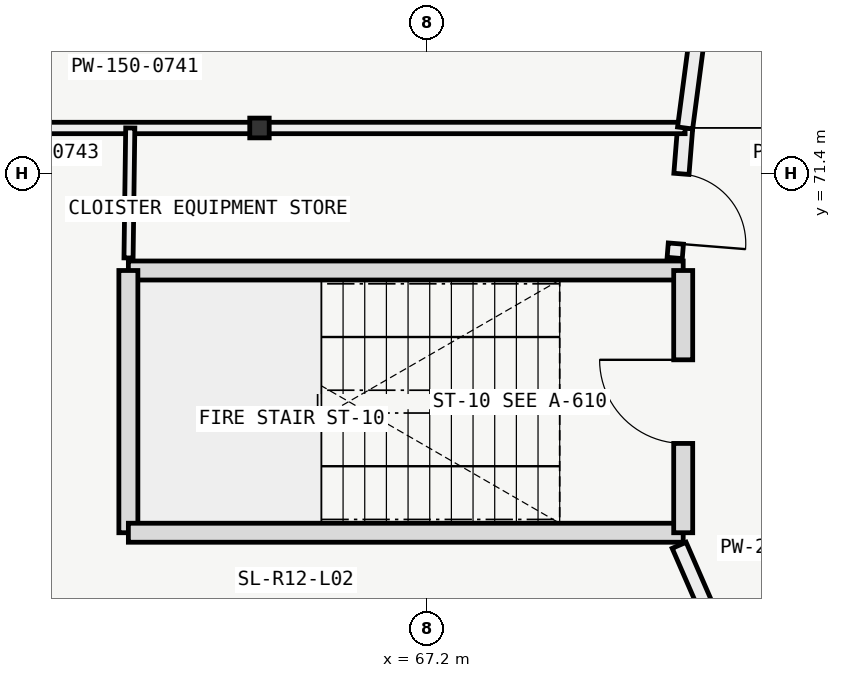
"""IFC4 building model, lengths in metres.
Left out: names, types, materials, properties, quantities, classifications, styles, units other than length and angle.
Written with IfcOpenShell. Run it as: python <this file> out.ifc"""

import sys

from ifc_helpers import new_model, si_unit, direction, frame, frame_2d, origin, origin_2d, place, context, subcontext, project, spatial, rectangle, i_section, extrude, element, fill, save


model = new_model("IFC4")
c1 = context("Model", 3, precision=1e-05, world=origin(), true_north=direction((0.0, 1.0)))
c2 = subcontext(c1, "Body", "Model", "MODEL_VIEW")
j1 = project(units=[si_unit("LENGTHUNIT", "METRE"), si_unit("PLANEANGLEUNIT", "RADIAN")], contexts=[c1])
p1 = place(None, origin())
s1 = spatial("IfcSite", under=j1, at=p1, CompositionType="ELEMENT")
p2 = place(p1, origin())
s2 = spatial("IfcBuilding", under=s1, at=p2, CompositionType="ELEMENT")
p3 = place(p2, frame((0.0, 0.0, 9.6)))
s3 = spatial("IfcBuildingStorey", under=s2, at=p3, CompositionType="ELEMENT", Elevation=9.6)
p4 = place(p3, frame((65.0, 72.0, 0.0), z_axis=(0.0, 0.0, 1.0), x_axis=(1.0, 0.0, 0.0)))
e1 = element("IfcColumn", 1, at=p4, inside=s3, PredefinedType="COLUMN", context=c2, shape_type="SweptSolid", body=[
    extrude(i_section(OverallWidth=0.256, OverallDepth=0.26, WebThickness=0.01, FlangeThickness=0.017, FilletRadius=0.014, at=origin_2d()), origin(), (0.0, 0.0, 1.0), 4.2),
])
p5 = place(p3, frame((70.575, 70.125, 0.0), z_axis=(0.0, 0.0, 1.0), x_axis=(-1.0, 0.0, 0.0)))
e2 = element("IfcWall", 2, at=p5, inside=s3, PredefinedType="SOLIDWALL", context=c2, shape_type="SweptSolid", body=[
    extrude(rectangle(XDim=7.3, YDim=0.25, at=frame_2d((3.65, 0.0))), origin(), (0.0, 0.0, 1.0), 3.95),
])
p6 = place(p3, frame((63.275, 70.125, 0.0), z_axis=(0.0, 0.0, 1.0), x_axis=(0.0, -1.0, 0.0)))
e3 = element("IfcWall", 3, at=p6, inside=s3, PredefinedType="SOLIDWALL", context=c2, shape_type="SweptSolid", body=[
    extrude(rectangle(XDim=3.45, YDim=0.25, at=frame_2d((1.725, 0.0))), origin(), (0.0, 0.0, 1.0), 3.95),
])
p7 = place(p3, frame((63.275, 66.675, 0.0), z_axis=(0.0, 0.0, 1.0), x_axis=(1.0, 0.0, 0.0)))
e4 = element("IfcWall", 4, at=p7, inside=s3, PredefinedType="SOLIDWALL", context=c2, shape_type="SweptSolid", body=[
    extrude(rectangle(XDim=7.3, YDim=0.25, at=frame_2d((3.65, 0.0))), origin(), (0.0, 0.0, 1.0), 3.95),
])
p8 = place(p3, frame((70.575, 66.675, 0.0), z_axis=(0.0, 0.0, 1.0), x_axis=(0.0, 1.0, 0.0)))
e5 = element("IfcWall", 5, at=p8, inside=s3, PredefinedType="SOLIDWALL", context=c2, shape_type="SweptSolid", body=[
    extrude(rectangle(XDim=3.45, YDim=0.25, at=frame_2d((1.725, 0.0))), origin(), (0.0, 0.0, 1.0), 3.95),
])
p9 = place(p8, frame((1.175, 0.0, 0.0)))
e6 = element("IfcOpeningElement", 6, at=p9, cuts=e5, PredefinedType="OPENING", context=c2, shape_type="SweptSolid", body=[
    extrude(rectangle(XDim=1.1, YDim=2.2, at=frame_2d((0.55, 1.1))), frame((0.0, 0.135, 0.0), z_axis=(0.0, -1.0, 0.0), x_axis=(1.0, 0.0, 0.0)), (0.0, 0.0, 1.0), 0.27),
])
p10 = place(p3, frame((70.6, 72.0, 0.0), z_axis=(0.0, 0.0, 1.0), x_axis=(-0.07984138391, -0.996807580938, 0.0)))
e7 = element("IfcWall", 7, at=p10, inside=s3, PredefinedType="PARTITIONING", context=c2, shape_type="SweptSolid", body=[
    extrude(rectangle(XDim=1.715, YDim=0.2, at=frame_2d((0.858, 0.0))), origin(), (0.0, 0.0, 1.0), 3.402),
])
p11 = place(p10, frame((0.605, 0.0, 0.0)))
e8 = element("IfcOpeningElement", 8, at=p11, cuts=e7, PredefinedType="OPENING", context=c2, shape_type="SweptSolid", body=[
    extrude(rectangle(XDim=0.92, YDim=2.1, at=frame_2d((0.46, 1.05))), frame((0.0, 0.11, 0.0), z_axis=(0.0, -1.0, 0.0), x_axis=(1.0, 0.0, 0.0)), (0.0, 0.0, 1.0), 0.22),
])
p12 = place(p3, frame((70.522, 66.51, 0.0), z_axis=(0.0, 0.0, 1.0), x_axis=(0.399219580964, -0.916855346374, 0.0)))
e9 = element("IfcWall", 9, at=p12, inside=s3, PredefinedType="PARTITIONING", context=c2, shape_type="SweptSolid", body=[
    extrude(rectangle(XDim=2.876, YDim=0.2, at=frame_2d((1.438, 0.0))), origin(), (0.0, 0.0, 1.0), 3.402),
])
p13 = place(p12, frame((1.17, 0.0, 0.0)))
e10 = element("IfcOpeningElement", 10, at=p13, cuts=e9, PredefinedType="OPENING", context=c2, shape_type="SweptSolid", body=[
    extrude(rectangle(XDim=1.5, YDim=2.2, at=frame_2d((0.75, 1.1))), frame((0.0, 0.11, 0.0), z_axis=(0.0, -1.0, 0.0), x_axis=(1.0, 0.0, 0.0)), (0.0, 0.0, 1.0), 0.22),
])
p14 = place(p3, frame((70.6, 72.0, 0.0), z_axis=(0.0, 0.0, 1.0), x_axis=(-1.0, 0.0, 0.0)))
e11 = element("IfcWall", 11, at=p14, inside=s3, PredefinedType="PARTITIONING", context=c2, shape_type="SweptSolid", body=[
    extrude(rectangle(XDim=14.48, YDim=0.15, at=frame_2d((7.24, 0.0))), origin(), (0.0, 0.0, 1.0), 3.397),
])
p15 = place(p3, frame((63.277, 70.29, 0.0), z_axis=(0.0, 0.0, 1.0), x_axis=(0.013419693814, 0.999909951855, 0.0)))
e12 = element("IfcWall", 12, at=p15, inside=s3, PredefinedType="PARTITIONING", context=c2, shape_type="SweptSolid", body=[
    extrude(rectangle(XDim=1.71, YDim=0.12, at=frame_2d((0.855, 0.0))), origin(), (0.0, 0.0, 1.0), 3.397),
])
p16 = place(p3, frame((71.67, 80.127, 0.0), z_axis=(0.0, 0.0, 1.0), x_axis=(-0.130513066404, -0.991446589332, 0.0)))
e13 = element("IfcWall", 13, at=p16, inside=s3, PredefinedType="PARTITIONING", context=c2, shape_type="SweptSolid", body=[
    extrude(rectangle(XDim=8.197, YDim=0.2, at=frame_2d((4.099, 0.0))), origin(), (0.0, 0.0, 1.0), 3.402),
])
p17 = place(p9, origin())
e14 = element("IfcDoor", 14, at=p17, inside=s3, OperationType="SINGLE_SWING_RIGHT", PredefinedType="DOOR", context=c2, shape_type="SweptSolid", body=[
    extrude(rectangle(XDim=1.1, YDim=2.2, at=frame_2d((0.55, 1.1))), frame((0.0, 0.025, 0.0), z_axis=(0.0, -1.0, 0.0), x_axis=(1.0, 0.0, 0.0)), (0.0, 0.0, 1.0), 0.05),
])
fill(e6, e14)
p18 = place(p11, origin())
e15 = element("IfcDoor", 15, at=p18, inside=s3, OperationType="SINGLE_SWING_RIGHT", PredefinedType="DOOR", context=c2, shape_type="SweptSolid", body=[
    extrude(rectangle(XDim=0.92, YDim=2.1, at=frame_2d((0.46, 1.05))), frame((0.0, 0.025, 0.0), z_axis=(0.0, -1.0, 0.0), x_axis=(1.0, 0.0, 0.0)), (0.0, 0.0, 1.0), 0.05),
])
fill(e8, e15)
save(model, sys.argv[1])
